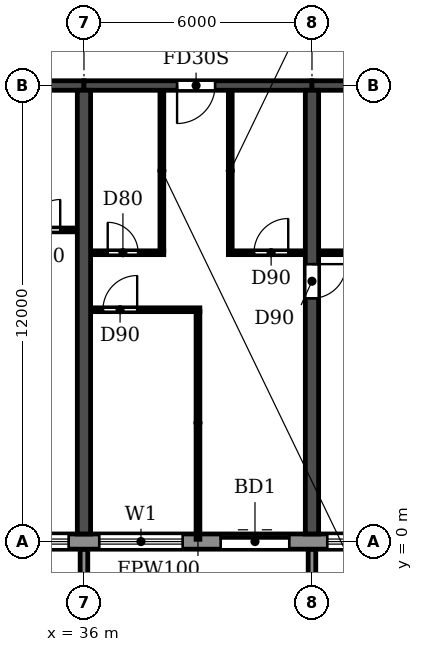
"""IFC4 building model, lengths in metres.
Left out: names, types, materials, properties, quantities, classifications, styles, units other than length and angle.
Written with IfcOpenShell. Run it as: python <this file> out.ifc"""

import sys

from ifc_helpers import new_model, si_unit, direction, frame, frame_2d, origin, place, context, subcontext, project, spatial, polyline, rectangle, outline, extrude, source, transform, mapped, element, fill, save


model = new_model("IFC4")
c1 = context("Model", 3, precision=1e-05, world=origin(), true_north=direction((0.0, 1.0)))
c2 = subcontext(c1, "Body", "Model", "MODEL_VIEW")
j1 = project(units=[si_unit("LENGTHUNIT", "METRE"), si_unit("PLANEANGLEUNIT", "RADIAN")], contexts=[c1])
p1 = place(None, origin())
s1 = spatial("IfcSite", under=j1, at=p1, CompositionType="ELEMENT")
p2 = place(p1, origin())
s2 = spatial("IfcBuilding", under=s1, at=p2, CompositionType="ELEMENT")
p3 = place(p2, frame((0.0, 0.0, 92.7)))
s3 = spatial("IfcBuildingStorey", under=s2, at=p3, CompositionType="ELEMENT", Elevation=92.7)
p4 = place(p3, frame((36.0, 0.2, 0.0), z_axis=(0.0, 0.0, 1.0), x_axis=(0.0, 1.0, 0.0)))
e1 = element("IfcWall", 1, at=p4, inside=s3, PredefinedType="SHEAR", context=c2, shape_type="SweptSolid", body=[
    extrude(rectangle(XDim=11.675, YDim=0.35, at=frame_2d((5.837, 0.0))), origin(), (0.0, 0.0, 1.0), 3.06),
])
p5 = place(p3, frame((42.0, 0.2, 0.0), z_axis=(0.0, 0.0, 1.0), x_axis=(0.0, 1.0, 0.0)))
e2 = element("IfcWall", 2, at=p5, inside=s3, PredefinedType="SHEAR", context=c2, shape_type="SweptSolid", body=[
    extrude(rectangle(XDim=11.675, YDim=0.35, at=frame_2d((5.837, 0.0))), origin(), (0.0, 0.0, 1.0), 3.06),
])
p6 = place(p5, frame((6.2, 0.0, 0.0)))
e3 = element("IfcOpeningElement", 3, at=p6, cuts=e2, PredefinedType="OPENING", context=c2, shape_type="SweptSolid", body=[
    extrude(rectangle(XDim=0.9, YDim=2.1, at=frame_2d((0.45, 1.05))), frame((0.0, 0.185, 0.0), z_axis=(0.0, -1.0, 0.0), x_axis=(1.0, 0.0, 0.0)), (0.0, 0.0, 1.0), 0.37),
])
p7 = place(p3, frame((30.0, 12.0, 0.0), z_axis=(0.0, 0.0, 1.0), x_axis=(1.0, 0.0, 0.0)))
e4 = element("IfcWall", 4, at=p7, inside=s3, PredefinedType="SHEAR", context=c2, shape_type="SweptSolid", body=[
    extrude(rectangle(XDim=6.0, YDim=0.25, at=frame_2d((3.0, 0.0))), origin(), (0.0, 0.0, 1.0), 2.46),
])
p8 = place(p7, frame((2.55, 0.0, 0.0)))
e5 = element("IfcOpeningElement", 5, at=p8, cuts=e4, PredefinedType="OPENING", context=c2, shape_type="SweptSolid", body=[
    extrude(rectangle(XDim=1.0, YDim=2.1, at=frame_2d((0.5, 1.05))), frame((0.0, 0.135, 0.0), z_axis=(0.0, -1.0, 0.0), x_axis=(1.0, 0.0, 0.0)), (0.0, 0.0, 1.0), 0.27),
])
p9 = place(p3, frame((36.0, 12.0, 0.0), z_axis=(0.0, 0.0, 1.0), x_axis=(1.0, 0.0, 0.0)))
e6 = element("IfcWall", 6, at=p9, inside=s3, PredefinedType="SHEAR", context=c2, shape_type="SweptSolid", body=[
    extrude(rectangle(XDim=6.0, YDim=0.25, at=frame_2d((3.0, 0.0))), origin(), (0.0, 0.0, 1.0), 2.46),
])
p10 = place(p9, frame((2.45, 0.0, 0.0)))
e7 = element("IfcOpeningElement", 7, at=p10, cuts=e6, PredefinedType="OPENING", context=c2, shape_type="SweptSolid", body=[
    extrude(rectangle(XDim=1.0, YDim=2.1, at=frame_2d((0.5, 1.05))), frame((0.0, 0.135, 0.0), z_axis=(0.0, -1.0, 0.0), x_axis=(1.0, 0.0, 0.0)), (0.0, 0.0, 1.0), 0.27),
])
p11 = place(p3, frame((42.0, 12.0, 0.0), z_axis=(0.0, 0.0, 1.0), x_axis=(1.0, 0.0, 0.0)))
e8 = element("IfcWall", 8, at=p11, inside=s3, PredefinedType="SHEAR", context=c2, shape_type="SweptSolid", body=[
    extrude(rectangle(XDim=6.0, YDim=0.25, at=frame_2d((3.0, 0.0))), origin(), (0.0, 0.0, 1.0), 2.46),
])
p12 = place(p3, frame((10.683, 0.0, 0.0), z_axis=(0.0, 0.0, 1.0), x_axis=(1.0, 0.0, 0.0)))
e9 = element("IfcWall", 9, at=p12, inside=s3, PredefinedType="STANDARD", context=c2, shape_type="SweptSolid", body=[
    extrude(rectangle(XDim=80.634, YDim=0.4, at=frame_2d((40.317, 0.0))), origin(), (0.0, 0.0, 1.0), 3.06),
])
p13 = place(p12, frame((1.717, 0.0, 0.9)))
e10 = element("IfcOpeningElement", 10, at=p13, cuts=e9, PredefinedType="OPENING", context=c2, shape_type="SweptSolid", body=[
    extrude(rectangle(XDim=2.2, YDim=1.5, at=frame_2d((1.1, 0.75))), frame((0.0, 0.21, 0.0), z_axis=(0.0, -1.0, 0.0), x_axis=(1.0, 0.0, 0.0)), (0.0, 0.0, 1.0), 0.42),
])
p14 = place(p12, frame((4.917, 0.0, 0.0)))
e11 = element("IfcOpeningElement", 11, at=p14, cuts=e9, PredefinedType="OPENING", context=c2, shape_type="SweptSolid", body=[
    extrude(rectangle(XDim=1.8, YDim=2.4, at=frame_2d((0.9, 1.2))), frame((0.0, 0.21, 0.0), z_axis=(0.0, -1.0, 0.0), x_axis=(1.0, 0.0, 0.0)), (0.0, 0.0, 1.0), 0.42),
])
p15 = place(p12, frame((7.717, 0.0, 0.9)))
e12 = element("IfcOpeningElement", 12, at=p15, cuts=e9, PredefinedType="OPENING", context=c2, shape_type="SweptSolid", body=[
    extrude(rectangle(XDim=2.2, YDim=1.5, at=frame_2d((1.1, 0.75))), frame((0.0, 0.21, 0.0), z_axis=(0.0, -1.0, 0.0), x_axis=(1.0, 0.0, 0.0)), (0.0, 0.0, 1.0), 0.42),
])
p16 = place(p12, frame((10.717, 0.0, 0.9)))
e13 = element("IfcOpeningElement", 13, at=p16, cuts=e9, PredefinedType="OPENING", context=c2, shape_type="SweptSolid", body=[
    extrude(rectangle(XDim=2.2, YDim=1.5, at=frame_2d((1.1, 0.75))), frame((0.0, 0.21, 0.0), z_axis=(0.0, -1.0, 0.0), x_axis=(1.0, 0.0, 0.0)), (0.0, 0.0, 1.0), 0.42),
])
p17 = place(p12, frame((13.717, 0.0, 0.9)))
e14 = element("IfcOpeningElement", 14, at=p17, cuts=e9, PredefinedType="OPENING", context=c2, shape_type="SweptSolid", body=[
    extrude(rectangle(XDim=2.2, YDim=1.5, at=frame_2d((1.1, 0.75))), frame((0.0, 0.21, 0.0), z_axis=(0.0, -1.0, 0.0), x_axis=(1.0, 0.0, 0.0)), (0.0, 0.0, 1.0), 0.42),
])
p18 = place(p12, frame((16.717, 0.0, 0.9)))
e15 = element("IfcOpeningElement", 15, at=p18, cuts=e9, PredefinedType="OPENING", context=c2, shape_type="SweptSolid", body=[
    extrude(rectangle(XDim=2.2, YDim=1.5, at=frame_2d((1.1, 0.75))), frame((0.0, 0.21, 0.0), z_axis=(0.0, -1.0, 0.0), x_axis=(1.0, 0.0, 0.0)), (0.0, 0.0, 1.0), 0.42),
])
p19 = place(p12, frame((19.717, 0.0, 0.9)))
e16 = element("IfcOpeningElement", 16, at=p19, cuts=e9, PredefinedType="OPENING", context=c2, shape_type="SweptSolid", body=[
    extrude(rectangle(XDim=2.2, YDim=1.5, at=frame_2d((1.1, 0.75))), frame((0.0, 0.21, 0.0), z_axis=(0.0, -1.0, 0.0), x_axis=(1.0, 0.0, 0.0)), (0.0, 0.0, 1.0), 0.42),
])
p20 = place(p12, frame((22.717, 0.0, 0.9)))
e17 = element("IfcOpeningElement", 17, at=p20, cuts=e9, PredefinedType="OPENING", context=c2, shape_type="SweptSolid", body=[
    extrude(rectangle(XDim=2.2, YDim=1.5, at=frame_2d((1.1, 0.75))), frame((0.0, 0.21, 0.0), z_axis=(0.0, -1.0, 0.0), x_axis=(1.0, 0.0, 0.0)), (0.0, 0.0, 1.0), 0.42),
])
p21 = place(p12, frame((25.717, 0.0, 0.9)))
e18 = element("IfcOpeningElement", 18, at=p21, cuts=e9, PredefinedType="OPENING", context=c2, shape_type="SweptSolid", body=[
    extrude(rectangle(XDim=2.2, YDim=1.5, at=frame_2d((1.1, 0.75))), frame((0.0, 0.21, 0.0), z_axis=(0.0, -1.0, 0.0), x_axis=(1.0, 0.0, 0.0)), (0.0, 0.0, 1.0), 0.42),
])
p22 = place(p12, frame((28.917, 0.0, 0.0)))
e19 = element("IfcOpeningElement", 19, at=p22, cuts=e9, PredefinedType="OPENING", context=c2, shape_type="SweptSolid", body=[
    extrude(rectangle(XDim=1.8, YDim=2.4, at=frame_2d((0.9, 1.2))), frame((0.0, 0.21, 0.0), z_axis=(0.0, -1.0, 0.0), x_axis=(1.0, 0.0, 0.0)), (0.0, 0.0, 1.0), 0.42),
])
p23 = place(p12, frame((31.717, 0.0, 0.9)))
e20 = element("IfcOpeningElement", 20, at=p23, cuts=e9, PredefinedType="OPENING", context=c2, shape_type="SweptSolid", body=[
    extrude(rectangle(XDim=2.2, YDim=1.5, at=frame_2d((1.1, 0.75))), frame((0.0, 0.21, 0.0), z_axis=(0.0, -1.0, 0.0), x_axis=(1.0, 0.0, 0.0)), (0.0, 0.0, 1.0), 0.42),
])
p24 = place(p12, frame((34.717, 0.0, 0.9)))
e21 = element("IfcOpeningElement", 21, at=p24, cuts=e9, PredefinedType="OPENING", context=c2, shape_type="SweptSolid", body=[
    extrude(rectangle(XDim=2.2, YDim=1.5, at=frame_2d((1.1, 0.75))), frame((0.0, 0.21, 0.0), z_axis=(0.0, -1.0, 0.0), x_axis=(1.0, 0.0, 0.0)), (0.0, 0.0, 1.0), 0.42),
])
p25 = place(p12, frame((37.917, 0.0, 0.0)))
e22 = element("IfcOpeningElement", 22, at=p25, cuts=e9, PredefinedType="OPENING", context=c2, shape_type="SweptSolid", body=[
    extrude(rectangle(XDim=1.8, YDim=2.4, at=frame_2d((0.9, 1.2))), frame((0.0, 0.21, 0.0), z_axis=(0.0, -1.0, 0.0), x_axis=(1.0, 0.0, 0.0)), (0.0, 0.0, 1.0), 0.42),
])
p26 = place(p12, frame((40.717, 0.0, 0.9)))
e23 = element("IfcOpeningElement", 23, at=p26, cuts=e9, PredefinedType="OPENING", context=c2, shape_type="SweptSolid", body=[
    extrude(rectangle(XDim=2.2, YDim=1.5, at=frame_2d((1.1, 0.75))), frame((0.0, 0.21, 0.0), z_axis=(0.0, -1.0, 0.0), x_axis=(1.0, 0.0, 0.0)), (0.0, 0.0, 1.0), 0.42),
])
p27 = place(p12, frame((43.717, 0.0, 0.9)))
e24 = element("IfcOpeningElement", 24, at=p27, cuts=e9, PredefinedType="OPENING", context=c2, shape_type="SweptSolid", body=[
    extrude(rectangle(XDim=2.2, YDim=1.5, at=frame_2d((1.1, 0.75))), frame((0.0, 0.21, 0.0), z_axis=(0.0, -1.0, 0.0), x_axis=(1.0, 0.0, 0.0)), (0.0, 0.0, 1.0), 0.42),
])
p28 = place(p12, frame((46.717, 0.0, 0.9)))
e25 = element("IfcOpeningElement", 25, at=p28, cuts=e9, PredefinedType="OPENING", context=c2, shape_type="SweptSolid", body=[
    extrude(rectangle(XDim=2.2, YDim=1.5, at=frame_2d((1.1, 0.75))), frame((0.0, 0.21, 0.0), z_axis=(0.0, -1.0, 0.0), x_axis=(1.0, 0.0, 0.0)), (0.0, 0.0, 1.0), 0.42),
])
p29 = place(p12, frame((49.717, 0.0, 0.9)))
e26 = element("IfcOpeningElement", 26, at=p29, cuts=e9, PredefinedType="OPENING", context=c2, shape_type="SweptSolid", body=[
    extrude(rectangle(XDim=2.2, YDim=1.5, at=frame_2d((1.1, 0.75))), frame((0.0, 0.21, 0.0), z_axis=(0.0, -1.0, 0.0), x_axis=(1.0, 0.0, 0.0)), (0.0, 0.0, 1.0), 0.42),
])
p30 = place(p12, frame((52.917, 0.0, 0.0)))
e27 = element("IfcOpeningElement", 27, at=p30, cuts=e9, PredefinedType="OPENING", context=c2, shape_type="SweptSolid", body=[
    extrude(rectangle(XDim=1.8, YDim=2.4, at=frame_2d((0.9, 1.2))), frame((0.0, 0.21, 0.0), z_axis=(0.0, -1.0, 0.0), x_axis=(1.0, 0.0, 0.0)), (0.0, 0.0, 1.0), 0.42),
])
p31 = place(p12, frame((55.717, 0.0, 0.9)))
e28 = element("IfcOpeningElement", 28, at=p31, cuts=e9, PredefinedType="OPENING", context=c2, shape_type="SweptSolid", body=[
    extrude(rectangle(XDim=2.2, YDim=1.5, at=frame_2d((1.1, 0.75))), frame((0.0, 0.21, 0.0), z_axis=(0.0, -1.0, 0.0), x_axis=(1.0, 0.0, 0.0)), (0.0, 0.0, 1.0), 0.42),
])
p32 = place(p12, frame((58.717, 0.0, 0.9)))
e29 = element("IfcOpeningElement", 29, at=p32, cuts=e9, PredefinedType="OPENING", context=c2, shape_type="SweptSolid", body=[
    extrude(rectangle(XDim=2.2, YDim=1.5, at=frame_2d((1.1, 0.75))), frame((0.0, 0.21, 0.0), z_axis=(0.0, -1.0, 0.0), x_axis=(1.0, 0.0, 0.0)), (0.0, 0.0, 1.0), 0.42),
])
p33 = place(p12, frame((61.717, 0.0, 0.9)))
e30 = element("IfcOpeningElement", 30, at=p33, cuts=e9, PredefinedType="OPENING", context=c2, shape_type="SweptSolid", body=[
    extrude(rectangle(XDim=2.2, YDim=1.5, at=frame_2d((1.1, 0.75))), frame((0.0, 0.21, 0.0), z_axis=(0.0, -1.0, 0.0), x_axis=(1.0, 0.0, 0.0)), (0.0, 0.0, 1.0), 0.42),
])
p34 = place(p12, frame((64.917, 0.0, 0.0)))
e31 = element("IfcOpeningElement", 31, at=p34, cuts=e9, PredefinedType="OPENING", context=c2, shape_type="SweptSolid", body=[
    extrude(rectangle(XDim=1.8, YDim=2.4, at=frame_2d((0.9, 1.2))), frame((0.0, 0.21, 0.0), z_axis=(0.0, -1.0, 0.0), x_axis=(1.0, 0.0, 0.0)), (0.0, 0.0, 1.0), 0.42),
])
p35 = place(p12, frame((67.717, 0.0, 0.9)))
e32 = element("IfcOpeningElement", 32, at=p35, cuts=e9, PredefinedType="OPENING", context=c2, shape_type="SweptSolid", body=[
    extrude(rectangle(XDim=2.2, YDim=1.5, at=frame_2d((1.1, 0.75))), frame((0.0, 0.21, 0.0), z_axis=(0.0, -1.0, 0.0), x_axis=(1.0, 0.0, 0.0)), (0.0, 0.0, 1.0), 0.42),
])
p36 = place(p12, frame((70.717, 0.0, 0.9)))
e33 = element("IfcOpeningElement", 33, at=p36, cuts=e9, PredefinedType="OPENING", context=c2, shape_type="SweptSolid", body=[
    extrude(rectangle(XDim=2.2, YDim=1.5, at=frame_2d((1.1, 0.75))), frame((0.0, 0.21, 0.0), z_axis=(0.0, -1.0, 0.0), x_axis=(1.0, 0.0, 0.0)), (0.0, 0.0, 1.0), 0.42),
])
p37 = place(p12, frame((73.917, 0.0, 0.0)))
e34 = element("IfcOpeningElement", 34, at=p37, cuts=e9, PredefinedType="OPENING", context=c2, shape_type="SweptSolid", body=[
    extrude(rectangle(XDim=1.8, YDim=2.4, at=frame_2d((0.9, 1.2))), frame((0.0, 0.21, 0.0), z_axis=(0.0, -1.0, 0.0), x_axis=(1.0, 0.0, 0.0)), (0.0, 0.0, 1.0), 0.42),
])
p38 = place(p12, frame((76.717, 0.0, 0.9)))
e35 = element("IfcOpeningElement", 35, at=p38, cuts=e9, PredefinedType="OPENING", context=c2, shape_type="SweptSolid", body=[
    extrude(rectangle(XDim=2.2, YDim=1.5, at=frame_2d((1.1, 0.75))), frame((0.0, 0.21, 0.0), z_axis=(0.0, -1.0, 0.0), x_axis=(1.0, 0.0, 0.0)), (0.0, 0.0, 1.0), 0.42),
])
m1 = source(origin(), c2, "Body", "SweptSolid", [
    extrude(outline(polyline([(0.0, 0.0), (0.2, 0.0), (0.2, 1.65), (0.0, 1.65), (0.0, 0.0)])), origin(), (0.0, 0.0, 1.0), 3.1),
])
for number, where in (
    (36, (35.9, -1.85, 0.0)),
    (37, (41.9, -1.85, 0.0)),
):
    element("IfcWall", number, at=place(p3, frame(where)), inside=s3, PredefinedType="STANDARD", context=c2, shape_type="MappedRepresentation", body=[
        mapped(m1, transform((0.0, 0.0, 0.0))),
    ])
p39 = place(p3, frame((36.185, 6.1, 0.0), z_axis=(0.0, 0.0, 1.0), x_axis=(1.0, 0.0, 0.0)))
e38 = element("IfcWall", 38, at=p39, inside=s3, PredefinedType="PARTITIONING", context=c2, shape_type="SweptSolid", body=[
    extrude(rectangle(XDim=2.865, YDim=0.1, at=frame_2d((1.433, 0.0))), origin(), (0.0, 0.0, 1.0), 3.06),
])
p40 = place(p39, frame((0.315, 0.0, 0.0)))
e39 = element("IfcOpeningElement", 39, at=p40, cuts=e38, PredefinedType="OPENING", context=c2, shape_type="SweptSolid", body=[
    extrude(rectangle(XDim=0.9, YDim=2.1, at=frame_2d((0.45, 1.05))), frame((0.0, 0.06, 0.0), z_axis=(0.0, -1.0, 0.0), x_axis=(1.0, 0.0, 0.0)), (0.0, 0.0, 1.0), 0.12),
])
p41 = place(p3, frame((36.185, 7.6, 0.0), z_axis=(0.0, 0.0, 1.0), x_axis=(1.0, 0.0, 0.0)))
e40 = element("IfcWall", 40, at=p41, inside=s3, PredefinedType="PARTITIONING", context=c2, shape_type="SweptSolid", body=[
    extrude(rectangle(XDim=1.915, YDim=0.1, at=frame_2d((0.958, 0.0))), origin(), (0.0, 0.0, 1.0), 3.06),
])
p42 = place(p41, frame((0.44, 0.0, 0.0)))
e41 = element("IfcOpeningElement", 41, at=p42, cuts=e40, PredefinedType="OPENING", context=c2, shape_type="SweptSolid", body=[
    extrude(rectangle(XDim=0.8, YDim=2.1, at=frame_2d((0.4, 1.05))), frame((0.0, 0.06, 0.0), z_axis=(0.0, -1.0, 0.0), x_axis=(1.0, 0.0, 0.0)), (0.0, 0.0, 1.0), 0.12),
])
p43 = place(p3, frame((39.8, 7.6, 0.0), z_axis=(0.0, 0.0, 1.0), x_axis=(1.0, 0.0, 0.0)))
e42 = element("IfcWall", 42, at=p43, inside=s3, PredefinedType="PARTITIONING", context=c2, shape_type="SweptSolid", body=[
    extrude(rectangle(XDim=2.015, YDim=0.1, at=frame_2d((1.007, 0.0))), origin(), (0.0, 0.0, 1.0), 3.06),
])
p44 = place(p43, frame((0.675, 0.0, 0.0)))
e43 = element("IfcOpeningElement", 43, at=p44, cuts=e42, PredefinedType="OPENING", context=c2, shape_type="SweptSolid", body=[
    extrude(rectangle(XDim=0.9, YDim=2.1, at=frame_2d((0.45, 1.05))), frame((0.0, 0.06, 0.0), z_axis=(0.0, -1.0, 0.0), x_axis=(1.0, 0.0, 0.0)), (0.0, 0.0, 1.0), 0.12),
])
p45 = place(p3, frame((42.185, 7.6, 0.0), z_axis=(0.0, 0.0, 1.0), x_axis=(1.0, 0.0, 0.0)))
e44 = element("IfcWall", 44, at=p45, inside=s3, PredefinedType="PARTITIONING", context=c2, shape_type="SweptSolid", body=[
    extrude(rectangle(XDim=2.915, YDim=0.1, at=frame_2d((1.458, 0.0))), origin(), (0.0, 0.0, 1.0), 3.06),
])
p46 = place(p45, frame((0.915, 0.0, 0.0)))
e45 = element("IfcOpeningElement", 45, at=p46, cuts=e44, PredefinedType="OPENING", context=c2, shape_type="SweptSolid", body=[
    extrude(rectangle(XDim=0.8, YDim=2.1, at=frame_2d((0.4, 1.05))), frame((0.0, 0.06, 0.0), z_axis=(0.0, -1.0, 0.0), x_axis=(1.0, 0.0, 0.0)), (0.0, 0.0, 1.0), 0.12),
])
p47 = place(p3, frame((33.9, 8.2, 0.0), z_axis=(0.0, 0.0, 1.0), x_axis=(1.0, 0.0, 0.0)))
e46 = element("IfcWall", 46, at=p47, inside=s3, PredefinedType="PARTITIONING", context=c2, shape_type="SweptSolid", body=[
    extrude(rectangle(XDim=1.915, YDim=0.1, at=frame_2d((0.958, 0.0))), origin(), (0.0, 0.0, 1.0), 3.06),
])
p48 = place(p47, frame((0.675, 0.0, 0.0)))
e47 = element("IfcOpeningElement", 47, at=p48, cuts=e46, PredefinedType="OPENING", context=c2, shape_type="SweptSolid", body=[
    extrude(rectangle(XDim=0.8, YDim=2.1, at=frame_2d((0.4, 1.05))), frame((0.0, 0.06, 0.0), z_axis=(0.0, -1.0, 0.0), x_axis=(1.0, 0.0, 0.0)), (0.0, 0.0, 1.0), 0.12),
])
p49 = place(p3, frame((38.05, 7.65, 0.0), z_axis=(0.0, 0.0, 1.0), x_axis=(0.0, 1.0, 0.0)))
e48 = element("IfcWall", 48, at=p49, inside=s3, PredefinedType="PARTITIONING", context=c2, shape_type="SweptSolid", body=[
    extrude(rectangle(XDim=4.215, YDim=0.1, at=frame_2d((2.107, 0.0))), origin(), (0.0, 0.0, 1.0), 3.06),
])
p50 = place(p3, frame((39.0, 0.06, 0.0), z_axis=(0.0, 0.0, 1.0), x_axis=(0.0, 1.0, 0.0)))
e49 = element("IfcWall", 49, at=p50, inside=s3, PredefinedType="PARTITIONING", context=c2, shape_type="SweptSolid", body=[
    extrude(rectangle(XDim=5.99, YDim=0.1, at=frame_2d((2.995, 0.0))), origin(), (0.0, 0.0, 1.0), 3.06),
])
p51 = place(p3, frame((39.85, 7.65, 0.0), z_axis=(0.0, 0.0, 1.0), x_axis=(0.0, 1.0, 0.0)))
e50 = element("IfcWall", 50, at=p51, inside=s3, PredefinedType="PARTITIONING", context=c2, shape_type="SweptSolid", body=[
    extrude(rectangle(XDim=4.215, YDim=0.1, at=frame_2d((2.107, 0.0))), origin(), (0.0, 0.0, 1.0), 3.06),
])
p52 = place(p20, origin())
e51 = element("IfcWindow", 51, at=p52, inside=s3, PartitioningType="DOUBLE_PANEL_HORIZONTAL", PredefinedType="WINDOW", context=c2, shape_type="SweptSolid", body=[
    extrude(rectangle(XDim=2.2, YDim=1.5, at=frame_2d((1.1, 0.75))), frame((0.0, 0.03, 0.0), z_axis=(0.0, -1.0, 0.0), x_axis=(1.0, 0.0, 0.0)), (0.0, 0.0, 1.0), 0.06),
])
fill(e17, e51)
p53 = place(p21, origin())
e52 = element("IfcWindow", 52, at=p53, inside=s3, PartitioningType="DOUBLE_PANEL_HORIZONTAL", PredefinedType="WINDOW", context=c2, shape_type="SweptSolid", body=[
    extrude(rectangle(XDim=2.2, YDim=1.5, at=frame_2d((1.1, 0.75))), frame((0.0, 0.03, 0.0), z_axis=(0.0, -1.0, 0.0), x_axis=(1.0, 0.0, 0.0)), (0.0, 0.0, 1.0), 0.06),
])
fill(e18, e52)
p54 = place(p22, origin())
e53 = element("IfcDoor", 53, at=p54, inside=s3, OperationType="DOUBLE_DOOR_SLIDING", PredefinedType="DOOR", context=c2, shape_type="SweptSolid", body=[
    extrude(rectangle(XDim=1.8, YDim=2.4, at=frame_2d((0.9, 1.2))), frame((0.0, 0.025, 0.0), z_axis=(0.0, -1.0, 0.0), x_axis=(1.0, 0.0, 0.0)), (0.0, 0.0, 1.0), 0.05),
])
fill(e19, e53)
p55 = place(p23, origin())
e54 = element("IfcWindow", 54, at=p55, inside=s3, PartitioningType="DOUBLE_PANEL_HORIZONTAL", PredefinedType="WINDOW", context=c2, shape_type="SweptSolid", body=[
    extrude(rectangle(XDim=2.2, YDim=1.5, at=frame_2d((1.1, 0.75))), frame((0.0, 0.03, 0.0), z_axis=(0.0, -1.0, 0.0), x_axis=(1.0, 0.0, 0.0)), (0.0, 0.0, 1.0), 0.06),
])
fill(e20, e54)
p56 = place(p48, origin())
e55 = element("IfcDoor", 55, at=p56, inside=s3, OperationType="SINGLE_SWING_RIGHT", PredefinedType="DOOR", context=c2, shape_type="SweptSolid", body=[
    extrude(rectangle(XDim=0.8, YDim=2.1, at=frame_2d((0.4, 1.05))), frame((0.0, 0.025, 0.0), z_axis=(0.0, -1.0, 0.0), x_axis=(1.0, 0.0, 0.0)), (0.0, 0.0, 1.0), 0.05),
])
fill(e47, e55)
p57 = place(p40, origin())
e56 = element("IfcDoor", 56, at=p57, inside=s3, OperationType="SINGLE_SWING_RIGHT", PredefinedType="DOOR", context=c2, shape_type="SweptSolid", body=[
    extrude(rectangle(XDim=0.9, YDim=2.1, at=frame_2d((0.45, 1.05))), frame((0.0, 0.025, 0.0), z_axis=(0.0, -1.0, 0.0), x_axis=(1.0, 0.0, 0.0)), (0.0, 0.0, 1.0), 0.05),
])
fill(e39, e56)
p58 = place(p42, origin())
e57 = element("IfcDoor", 57, at=p58, inside=s3, OperationType="SINGLE_SWING_LEFT", PredefinedType="DOOR", context=c2, shape_type="SweptSolid", body=[
    extrude(rectangle(XDim=0.8, YDim=2.1, at=frame_2d((0.4, 1.05))), frame((0.0, 0.025, 0.0), z_axis=(0.0, -1.0, 0.0), x_axis=(1.0, 0.0, 0.0)), (0.0, 0.0, 1.0), 0.05),
])
fill(e41, e57)
p59 = place(p10, frame((1.0, 0.0, 0.0), z_axis=(0.0, 0.0, 1.0), x_axis=(-1.0, 0.0, 0.0)))
e58 = element("IfcDoor", 58, at=p59, inside=s3, OperationType="SINGLE_SWING_RIGHT", PredefinedType="DOOR", context=c2, shape_type="SweptSolid", body=[
    extrude(rectangle(XDim=1.0, YDim=2.1, at=frame_2d((0.5, 1.05))), frame((0.0, 0.025, 0.0), z_axis=(0.0, -1.0, 0.0), x_axis=(1.0, 0.0, 0.0)), (0.0, 0.0, 1.0), 0.05),
])
fill(e7, e58)
p60 = place(p44, origin())
e59 = element("IfcDoor", 59, at=p60, inside=s3, OperationType="SINGLE_SWING_RIGHT", PredefinedType="DOOR", context=c2, shape_type="SweptSolid", body=[
    extrude(rectangle(XDim=0.9, YDim=2.1, at=frame_2d((0.45, 1.05))), frame((0.0, 0.025, 0.0), z_axis=(0.0, -1.0, 0.0), x_axis=(1.0, 0.0, 0.0)), (0.0, 0.0, 1.0), 0.05),
])
fill(e43, e59)
p61 = place(p6, frame((0.9, 0.0, 0.0), z_axis=(0.0, 0.0, 1.0), x_axis=(-1.0, 0.0, 0.0)))
e60 = element("IfcDoor", 60, at=p61, inside=s3, OperationType="SINGLE_SWING_LEFT", PredefinedType="DOOR", context=c2, shape_type="SweptSolid", body=[
    extrude(rectangle(XDim=0.9, YDim=2.1, at=frame_2d((0.45, 1.05))), frame((0.0, 0.025, 0.0), z_axis=(0.0, -1.0, 0.0), x_axis=(1.0, 0.0, 0.0)), (0.0, 0.0, 1.0), 0.05),
])
fill(e3, e60)
save(model, sys.argv[1])
